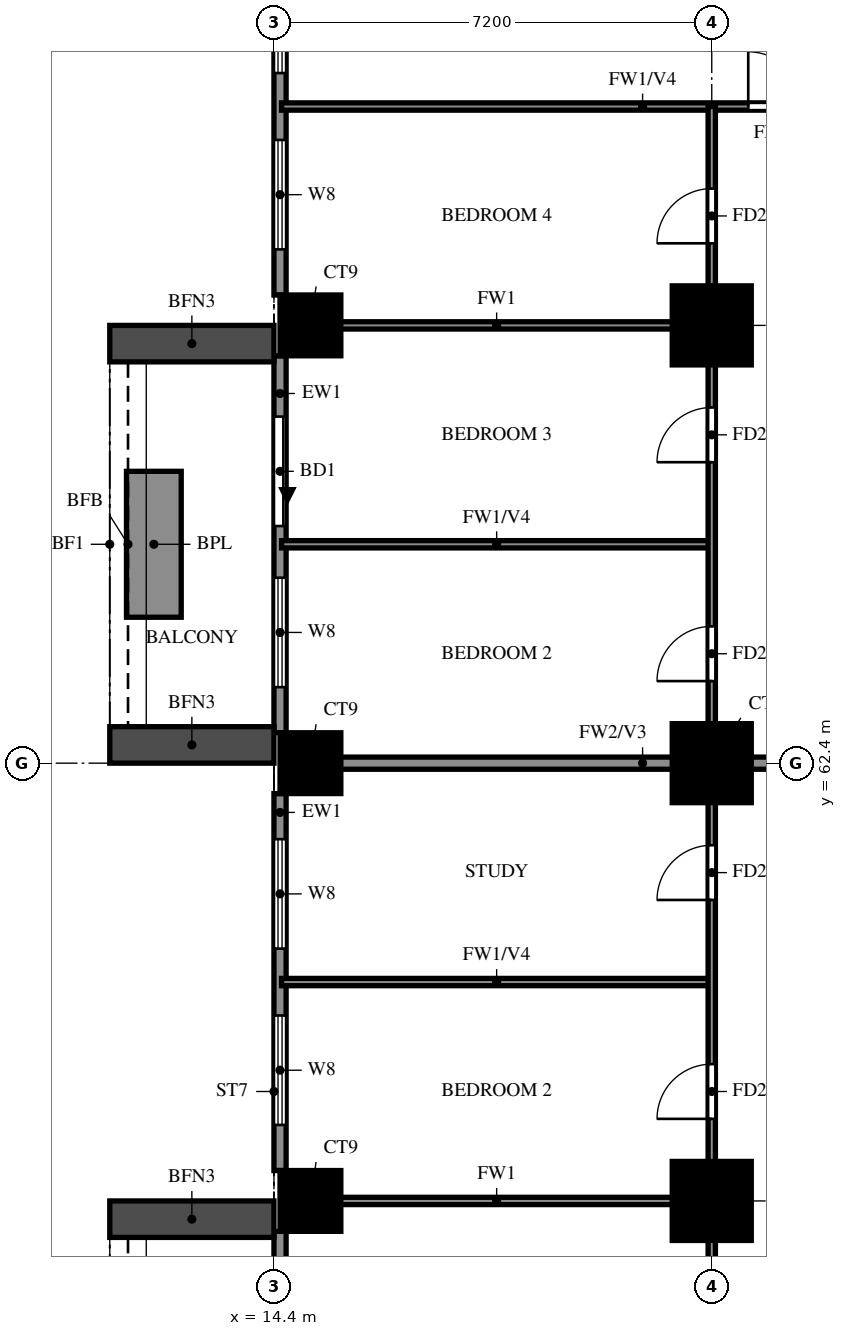
"""IFC4 building model, lengths in metres.
Left out: names, types, materials, properties, quantities, classifications, styles, units other than length and angle.
Written with IfcOpenShell. Run it as: python <this file> out.ifc"""

import sys

from ifc_helpers import new_model, si_unit, direction, frame, frame_2d, origin, origin_2d, place, context, subcontext, project, spatial, rectangle, extrude, source, transform, mapped, element, fill, save


model = new_model("IFC4")
c1 = context("Model", 3, precision=1e-05, world=origin(), true_north=direction((0.0, 1.0)))
c2 = subcontext(c1, "Body", "Model", "MODEL_VIEW")
j1 = project(units=[si_unit("LENGTHUNIT", "METRE"), si_unit("PLANEANGLEUNIT", "RADIAN")], contexts=[c1])
p1 = place(None, origin())
s1 = spatial("IfcSite", under=j1, at=p1, CompositionType="ELEMENT")
p2 = place(p1, origin())
s2 = spatial("IfcBuilding", under=s1, at=p2, CompositionType="ELEMENT")
p3 = place(p2, frame((0.0, 0.0, 79.5)))
s3 = spatial("IfcBuildingStorey", under=s2, at=p3, CompositionType="ELEMENT", Elevation=79.5)
m1 = source(origin(), c2, "Body", "SweptSolid", [
    extrude(rectangle(XDim=1.0, YDim=1.0, at=origin_2d()), origin(), (0.0, 0.0, 1.0), 3.18),
])
p4 = place(p3, frame((15.0, 55.2, 0.0), z_axis=(0.0, 0.0, 1.0), x_axis=(1.0, 0.0, 0.0)))
e1 = element("IfcColumn", 1, at=p4, inside=s3, PredefinedType="COLUMN", context=c2, shape_type="MappedRepresentation", body=[
    mapped(m1, transform((0.0, 0.0, 0.0))),
])
m2 = source(origin(), c2, "Body", "SweptSolid", [
    extrude(rectangle(XDim=1.3, YDim=1.3, at=origin_2d()), origin(), (0.0, 0.0, 1.0), 3.18),
])
p5 = place(p3, frame((21.6, 55.2, 0.0), z_axis=(0.0, 0.0, 1.0), x_axis=(1.0, 0.0, 0.0)))
e2 = element("IfcColumn", 2, at=p5, inside=s3, PredefinedType="COLUMN", context=c2, shape_type="MappedRepresentation", body=[
    mapped(m2, transform((0.0, 0.0, 0.0))),
])
p6 = place(p3, frame((15.0, 62.4, 0.0), z_axis=(0.0, 0.0, 1.0), x_axis=(1.0, 0.0, 0.0)))
e3 = element("IfcColumn", 3, at=p6, inside=s3, PredefinedType="COLUMN", context=c2, shape_type="MappedRepresentation", body=[
    mapped(m1, transform((0.0, 0.0, 0.0))),
])
p7 = place(p3, frame((21.6, 62.4, 0.0), z_axis=(0.0, 0.0, 1.0), x_axis=(1.0, 0.0, 0.0)))
e4 = element("IfcColumn", 4, at=p7, inside=s3, PredefinedType="COLUMN", context=c2, shape_type="MappedRepresentation", body=[
    mapped(m2, transform((0.0, 0.0, 0.0))),
])
p8 = place(p3, frame((15.0, 69.6, 0.0), z_axis=(0.0, 0.0, 1.0), x_axis=(1.0, 0.0, 0.0)))
e5 = element("IfcColumn", 5, at=p8, inside=s3, PredefinedType="COLUMN", context=c2, shape_type="MappedRepresentation", body=[
    mapped(m1, transform((0.0, 0.0, 0.0))),
])
p9 = place(p3, frame((21.6, 69.6, 0.0), z_axis=(0.0, 0.0, 1.0), x_axis=(1.0, 0.0, 0.0)))
e6 = element("IfcColumn", 6, at=p9, inside=s3, PredefinedType="COLUMN", context=c2, shape_type="MappedRepresentation", body=[
    mapped(m2, transform((0.0, 0.0, 0.0))),
])
p10 = place(p3, frame((14.5, 76.3, 0.0), z_axis=(0.0, 0.0, 1.0), x_axis=(0.0, -1.0, 0.0)))
e7 = element("IfcWall", 7, at=p10, inside=s3, PredefinedType="SOLIDWALL", context=c2, shape_type="SweptSolid", body=[
    extrude(rectangle(XDim=6.2, YDim=0.2, at=frame_2d((3.1, 0.0))), origin(), (0.0, 0.0, 1.0), 3.18),
])
p11 = place(p10, frame((3.65, 0.0, 0.6)))
e8 = element("IfcOpeningElement", 8, at=p11, cuts=e7, PredefinedType="OPENING", context=c2, shape_type="SweptSolid", body=[
    extrude(rectangle(XDim=1.8, YDim=2.4, at=frame_2d((0.9, 1.2))), frame((0.0, 0.11, 0.0), z_axis=(0.0, -1.0, 0.0), x_axis=(1.0, 0.0, 0.0)), (0.0, 0.0, 1.0), 0.22),
])
p12 = place(p10, frame((0.75, 0.0, 0.6)))
e9 = element("IfcOpeningElement", 9, at=p12, cuts=e7, PredefinedType="OPENING", context=c2, shape_type="SweptSolid", body=[
    extrude(rectangle(XDim=1.8, YDim=2.4, at=frame_2d((0.9, 1.2))), frame((0.0, 0.11, 0.0), z_axis=(0.0, -1.0, 0.0), x_axis=(1.0, 0.0, 0.0)), (0.0, 0.0, 1.0), 0.22),
])
p13 = place(p3, frame((14.5, 69.1, 0.0), z_axis=(0.0, 0.0, 1.0), x_axis=(0.0, -1.0, 0.0)))
e10 = element("IfcWall", 10, at=p13, inside=s3, PredefinedType="SOLIDWALL", context=c2, shape_type="SweptSolid", body=[
    extrude(rectangle(XDim=6.2, YDim=0.2, at=frame_2d((3.1, 0.0))), origin(), (0.0, 0.0, 1.0), 3.18),
])
p14 = place(p13, frame((1.0, 0.0, 0.0)))
e11 = element("IfcOpeningElement", 11, at=p14, cuts=e10, PredefinedType="OPENING", context=c2, shape_type="SweptSolid", body=[
    extrude(rectangle(XDim=1.8, YDim=2.4, at=frame_2d((0.9, 1.2))), frame((0.0, 0.11, 0.0), z_axis=(0.0, -1.0, 0.0), x_axis=(1.0, 0.0, 0.0)), (0.0, 0.0, 1.0), 0.22),
])
p15 = place(p13, frame((3.65, 0.0, 0.6)))
e12 = element("IfcOpeningElement", 12, at=p15, cuts=e10, PredefinedType="OPENING", context=c2, shape_type="SweptSolid", body=[
    extrude(rectangle(XDim=1.8, YDim=2.4, at=frame_2d((0.9, 1.2))), frame((0.0, 0.11, 0.0), z_axis=(0.0, -1.0, 0.0), x_axis=(1.0, 0.0, 0.0)), (0.0, 0.0, 1.0), 0.22),
])
p16 = place(p3, frame((14.5, 61.9, 0.0), z_axis=(0.0, 0.0, 1.0), x_axis=(0.0, -1.0, 0.0)))
e13 = element("IfcWall", 13, at=p16, inside=s3, PredefinedType="SOLIDWALL", context=c2, shape_type="SweptSolid", body=[
    extrude(rectangle(XDim=6.2, YDim=0.2, at=frame_2d((3.1, 0.0))), origin(), (0.0, 0.0, 1.0), 3.18),
])
p17 = place(p16, frame((3.65, 0.0, 0.6)))
e14 = element("IfcOpeningElement", 14, at=p17, cuts=e13, PredefinedType="OPENING", context=c2, shape_type="SweptSolid", body=[
    extrude(rectangle(XDim=1.8, YDim=2.4, at=frame_2d((0.9, 1.2))), frame((0.0, 0.11, 0.0), z_axis=(0.0, -1.0, 0.0), x_axis=(1.0, 0.0, 0.0)), (0.0, 0.0, 1.0), 0.22),
])
p18 = place(p16, frame((0.75, 0.0, 0.6)))
e15 = element("IfcOpeningElement", 15, at=p18, cuts=e13, PredefinedType="OPENING", context=c2, shape_type="SweptSolid", body=[
    extrude(rectangle(XDim=1.8, YDim=2.4, at=frame_2d((0.9, 1.2))), frame((0.0, 0.11, 0.0), z_axis=(0.0, -1.0, 0.0), x_axis=(1.0, 0.0, 0.0)), (0.0, 0.0, 1.0), 0.22),
])
p19 = place(p3, frame((14.5, 54.7, 0.0), z_axis=(0.0, 0.0, 1.0), x_axis=(0.0, -1.0, 0.0)))
e16 = element("IfcWall", 16, at=p19, inside=s3, PredefinedType="SOLIDWALL", context=c2, shape_type="SweptSolid", body=[
    extrude(rectangle(XDim=6.2, YDim=0.2, at=frame_2d((3.1, 0.0))), origin(), (0.0, 0.0, 1.0), 3.18),
])
p20 = place(p19, frame((2.2, 0.0, 0.0)))
e17 = element("IfcOpeningElement", 17, at=p20, cuts=e16, PredefinedType="OPENING", context=c2, shape_type="SweptSolid", body=[
    extrude(rectangle(XDim=1.8, YDim=2.4, at=frame_2d((0.9, 1.2))), frame((0.0, 0.11, 0.0), z_axis=(0.0, -1.0, 0.0), x_axis=(1.0, 0.0, 0.0)), (0.0, 0.0, 1.0), 0.22),
])
p21 = place(p19, frame((0.45, 0.0, 0.6)))
e18 = element("IfcOpeningElement", 18, at=p21, cuts=e16, PredefinedType="OPENING", context=c2, shape_type="SweptSolid", body=[
    extrude(rectangle(XDim=1.2, YDim=2.4, at=frame_2d((0.6, 1.2))), frame((0.0, 0.11, 0.0), z_axis=(0.0, -1.0, 0.0), x_axis=(1.0, 0.0, 0.0)), (0.0, 0.0, 1.0), 0.22),
])
p22 = place(p19, frame((4.55, 0.0, 0.6)))
e19 = element("IfcOpeningElement", 19, at=p22, cuts=e16, PredefinedType="OPENING", context=c2, shape_type="SweptSolid", body=[
    extrude(rectangle(XDim=1.2, YDim=2.4, at=frame_2d((0.6, 1.2))), frame((0.0, 0.11, 0.0), z_axis=(0.0, -1.0, 0.0), x_axis=(1.0, 0.0, 0.0)), (0.0, 0.0, 1.0), 0.22),
])
for number, where, z_axis, x_axis in (
    (20, (14.4, 69.3, 0.0), (0.0, 0.0, 1.0), (-1.0, 0.0, 0.0)),
    (21, (14.4, 62.7, 0.0), (0.0, 0.0, 1.0), (-1.0, 0.0, 0.0)),
):
    element("IfcWall", number, at=place(p3, frame(where, z_axis=z_axis, x_axis=x_axis)), inside=s3, PredefinedType="SOLIDWALL", context=c2, shape_type="SweptSolid", body=[
        extrude(rectangle(XDim=2.7, YDim=0.6, at=frame_2d((1.35, 0.0))), origin(), (0.0, 0.0, 1.0), 2.85),
    ])
p23 = place(p3, frame((12.425, 67.2, 0.0), z_axis=(0.0, 0.0, 1.0), x_axis=(0.0, -1.0, 0.0)))
e22 = element("IfcWall", 22, at=p23, inside=s3, PredefinedType="SOLIDWALL", context=c2, shape_type="SweptSolid", body=[
    extrude(rectangle(XDim=2.4, YDim=0.9, at=frame_2d((1.2, 0.0))), origin(), (0.0, 0.0, 1.0), 0.9),
])
p24 = place(p3, frame((14.4, 54.9, 0.0), z_axis=(0.0, 0.0, 1.0), x_axis=(-1.0, 0.0, 0.0)))
e23 = element("IfcWall", 23, at=p24, inside=s3, PredefinedType="SOLIDWALL", context=c2, shape_type="SweptSolid", body=[
    extrude(rectangle(XDim=2.7, YDim=0.6, at=frame_2d((1.35, 0.0))), origin(), (0.0, 0.0, 1.0), 2.85),
])
p25 = place(p3, frame((14.525, 62.4, 0.0), z_axis=(0.0, 0.0, 1.0), x_axis=(1.0, 0.0, 0.0)))
e24 = element("IfcWall", 24, at=p25, inside=s3, PredefinedType="SOLIDWALL", context=c2, shape_type="SweptSolid", body=[
    extrude(rectangle(XDim=11.875, YDim=0.2, at=frame_2d((5.938, 0.0))), origin(), (0.0, 0.0, 1.0), 3.18),
])
p26 = place(p3, frame((14.525, 55.2, 0.0), z_axis=(0.0, 0.0, 1.0), x_axis=(1.0, 0.0, 0.0)))
e25 = element("IfcWall", 25, at=p26, inside=s3, PredefinedType="PARTITIONING", context=c2, shape_type="SweptSolid", body=[
    extrude(rectangle(XDim=7.075, YDim=0.12, at=frame_2d((3.538, 0.0))), origin(), (0.0, 0.0, 1.0), 3.18),
])
for number, where, z_axis, x_axis in (
    (26, (14.525, 58.8, 0.0), (0.0, 0.0, 1.0), (1.0, 0.0, 0.0)),
    (27, (14.525, 66.0, 0.0), (0.0, 0.0, 1.0), (1.0, 0.0, 0.0)),
):
    element("IfcWall", number, at=place(p3, frame(where, z_axis=z_axis, x_axis=x_axis)), inside=s3, PredefinedType="PARTITIONING", context=c2, shape_type="SweptSolid", body=[
        extrude(rectangle(XDim=7.075, YDim=0.12, at=frame_2d((3.538, 0.0))), origin(), (0.0, 0.0, 1.0), 2.28),
    ])
p27 = place(p3, frame((14.525, 69.6, 0.0), z_axis=(0.0, 0.0, 1.0), x_axis=(1.0, 0.0, 0.0)))
e28 = element("IfcWall", 28, at=p27, inside=s3, PredefinedType="PARTITIONING", context=c2, shape_type="SweptSolid", body=[
    extrude(rectangle(XDim=7.075, YDim=0.12, at=frame_2d((3.538, 0.0))), origin(), (0.0, 0.0, 1.0), 3.18),
])
p28 = place(p3, frame((14.525, 73.2, 0.0), z_axis=(0.0, 0.0, 1.0), x_axis=(1.0, 0.0, 0.0)))
e29 = element("IfcWall", 29, at=p28, inside=s3, PredefinedType="PARTITIONING", context=c2, shape_type="SweptSolid", body=[
    extrude(rectangle(XDim=11.875, YDim=0.12, at=frame_2d((5.938, 0.0))), origin(), (0.0, 0.0, 1.0), 2.28),
])
p29 = place(p28, frame((7.675, 0.0, 0.0)))
e30 = element("IfcOpeningElement", 30, at=p29, cuts=e29, PredefinedType="OPENING", context=c2, shape_type="SweptSolid", body=[
    extrude(rectangle(XDim=0.9, YDim=2.1, at=frame_2d((0.45, 1.05))), frame((0.0, 0.07, 0.0), z_axis=(0.0, -1.0, 0.0), x_axis=(1.0, 0.0, 0.0)), (0.0, 0.0, 1.0), 0.14),
])
p30 = place(p3, frame((21.6, 33.725, 0.0), z_axis=(0.0, 0.0, 1.0), x_axis=(0.0, 1.0, 0.0)))
e31 = element("IfcWall", 31, at=p30, inside=s3, PredefinedType="PARTITIONING", context=c2, shape_type="SweptSolid", body=[
    extrude(rectangle(XDim=39.475, YDim=0.12, at=frame_2d((19.737, 0.0))), origin(), (0.0, 0.0, 1.0), 3.18),
])
p31 = place(p30, frame((7.775, 0.0, 0.0)))
e32 = element("IfcOpeningElement", 32, at=p31, cuts=e31, PredefinedType="OPENING", context=c2, shape_type="SweptSolid", body=[
    extrude(rectangle(XDim=0.9, YDim=2.1, at=frame_2d((0.45, 1.05))), frame((0.0, 0.07, 0.0), z_axis=(0.0, -1.0, 0.0), x_axis=(1.0, 0.0, 0.0)), (0.0, 0.0, 1.0), 0.14),
])
p32 = place(p30, frame((17.125, 0.0, 0.0)))
e33 = element("IfcOpeningElement", 33, at=p32, cuts=e31, PredefinedType="OPENING", context=c2, shape_type="SweptSolid", body=[
    extrude(rectangle(XDim=1.5, YDim=2.1, at=frame_2d((0.75, 1.05))), frame((0.0, 0.07, 0.0), z_axis=(0.0, -1.0, 0.0), x_axis=(1.0, 0.0, 0.0)), (0.0, 0.0, 1.0), 0.14),
])
p33 = place(p30, frame((22.825, 0.0, 0.0)))
e34 = element("IfcOpeningElement", 34, at=p33, cuts=e31, PredefinedType="OPENING", context=c2, shape_type="SweptSolid", body=[
    extrude(rectangle(XDim=0.9, YDim=2.1, at=frame_2d((0.45, 1.05))), frame((0.0, 0.07, 0.0), z_axis=(0.0, -1.0, 0.0), x_axis=(1.0, 0.0, 0.0)), (0.0, 0.0, 1.0), 0.14),
])
p34 = place(p30, frame((26.425, 0.0, 0.0)))
e35 = element("IfcOpeningElement", 35, at=p34, cuts=e31, PredefinedType="OPENING", context=c2, shape_type="SweptSolid", body=[
    extrude(rectangle(XDim=0.9, YDim=2.1, at=frame_2d((0.45, 1.05))), frame((0.0, 0.07, 0.0), z_axis=(0.0, -1.0, 0.0), x_axis=(1.0, 0.0, 0.0)), (0.0, 0.0, 1.0), 0.14),
])
p35 = place(p30, frame((30.025, 0.0, 0.0)))
e36 = element("IfcOpeningElement", 36, at=p35, cuts=e31, PredefinedType="OPENING", context=c2, shape_type="SweptSolid", body=[
    extrude(rectangle(XDim=0.9, YDim=2.1, at=frame_2d((0.45, 1.05))), frame((0.0, 0.07, 0.0), z_axis=(0.0, -1.0, 0.0), x_axis=(1.0, 0.0, 0.0)), (0.0, 0.0, 1.0), 0.14),
])
p36 = place(p30, frame((33.625, 0.0, 0.0)))
e37 = element("IfcOpeningElement", 37, at=p36, cuts=e31, PredefinedType="OPENING", context=c2, shape_type="SweptSolid", body=[
    extrude(rectangle(XDim=0.9, YDim=2.1, at=frame_2d((0.45, 1.05))), frame((0.0, 0.07, 0.0), z_axis=(0.0, -1.0, 0.0), x_axis=(1.0, 0.0, 0.0)), (0.0, 0.0, 1.0), 0.14),
])
p37 = place(p30, frame((37.225, 0.0, 0.0)))
e38 = element("IfcOpeningElement", 38, at=p37, cuts=e31, PredefinedType="OPENING", context=c2, shape_type="SweptSolid", body=[
    extrude(rectangle(XDim=0.9, YDim=2.1, at=frame_2d((0.45, 1.05))), frame((0.0, 0.07, 0.0), z_axis=(0.0, -1.0, 0.0), x_axis=(1.0, 0.0, 0.0)), (0.0, 0.0, 1.0), 0.14),
])
p38 = place(p11, origin())
e39 = element("IfcWindow", 39, at=p38, inside=s3, PartitioningType="DOUBLE_PANEL_VERTICAL", PredefinedType="WINDOW", context=c2, shape_type="SweptSolid", body=[
    extrude(rectangle(XDim=1.8, YDim=2.4, at=frame_2d((0.9, 1.2))), frame((0.0, 0.03, 0.0), z_axis=(0.0, -1.0, 0.0), x_axis=(1.0, 0.0, 0.0)), (0.0, 0.0, 1.0), 0.06),
])
fill(e8, e39)
p39 = place(p12, origin())
e40 = element("IfcWindow", 40, at=p39, inside=s3, PartitioningType="DOUBLE_PANEL_VERTICAL", PredefinedType="WINDOW", context=c2, shape_type="SweptSolid", body=[
    extrude(rectangle(XDim=1.8, YDim=2.4, at=frame_2d((0.9, 1.2))), frame((0.0, 0.03, 0.0), z_axis=(0.0, -1.0, 0.0), x_axis=(1.0, 0.0, 0.0)), (0.0, 0.0, 1.0), 0.06),
])
fill(e9, e40)
p40 = place(p14, origin())
e41 = element("IfcDoor", 41, at=p40, inside=s3, OperationType="DOUBLE_DOOR_SLIDING", PredefinedType="DOOR", context=c2, shape_type="SweptSolid", body=[
    extrude(rectangle(XDim=1.8, YDim=2.4, at=frame_2d((0.9, 1.2))), frame((0.0, 0.025, 0.0), z_axis=(0.0, -1.0, 0.0), x_axis=(1.0, 0.0, 0.0)), (0.0, 0.0, 1.0), 0.05),
])
fill(e11, e41)
p41 = place(p15, origin())
e42 = element("IfcWindow", 42, at=p41, inside=s3, PartitioningType="DOUBLE_PANEL_VERTICAL", PredefinedType="WINDOW", context=c2, shape_type="SweptSolid", body=[
    extrude(rectangle(XDim=1.8, YDim=2.4, at=frame_2d((0.9, 1.2))), frame((0.0, 0.03, 0.0), z_axis=(0.0, -1.0, 0.0), x_axis=(1.0, 0.0, 0.0)), (0.0, 0.0, 1.0), 0.06),
])
fill(e12, e42)
p42 = place(p17, origin())
e43 = element("IfcWindow", 43, at=p42, inside=s3, PartitioningType="DOUBLE_PANEL_VERTICAL", PredefinedType="WINDOW", context=c2, shape_type="SweptSolid", body=[
    extrude(rectangle(XDim=1.8, YDim=2.4, at=frame_2d((0.9, 1.2))), frame((0.0, 0.03, 0.0), z_axis=(0.0, -1.0, 0.0), x_axis=(1.0, 0.0, 0.0)), (0.0, 0.0, 1.0), 0.06),
])
fill(e14, e43)
p43 = place(p18, origin())
e44 = element("IfcWindow", 44, at=p43, inside=s3, PartitioningType="DOUBLE_PANEL_VERTICAL", PredefinedType="WINDOW", context=c2, shape_type="SweptSolid", body=[
    extrude(rectangle(XDim=1.8, YDim=2.4, at=frame_2d((0.9, 1.2))), frame((0.0, 0.03, 0.0), z_axis=(0.0, -1.0, 0.0), x_axis=(1.0, 0.0, 0.0)), (0.0, 0.0, 1.0), 0.06),
])
fill(e15, e44)
p44 = place(p33, origin())
e45 = element("IfcDoor", 45, at=p44, inside=s3, OperationType="SINGLE_SWING_LEFT", PredefinedType="DOOR", context=c2, shape_type="SweptSolid", body=[
    extrude(rectangle(XDim=0.9, YDim=2.1, at=frame_2d((0.45, 1.05))), frame((0.0, 0.025, 0.0), z_axis=(0.0, -1.0, 0.0), x_axis=(1.0, 0.0, 0.0)), (0.0, 0.0, 1.0), 0.05),
])
fill(e34, e45)
p45 = place(p34, origin())
e46 = element("IfcDoor", 46, at=p45, inside=s3, OperationType="SINGLE_SWING_LEFT", PredefinedType="DOOR", context=c2, shape_type="SweptSolid", body=[
    extrude(rectangle(XDim=0.9, YDim=2.1, at=frame_2d((0.45, 1.05))), frame((0.0, 0.025, 0.0), z_axis=(0.0, -1.0, 0.0), x_axis=(1.0, 0.0, 0.0)), (0.0, 0.0, 1.0), 0.05),
])
fill(e35, e46)
p46 = place(p35, origin())
e47 = element("IfcDoor", 47, at=p46, inside=s3, OperationType="SINGLE_SWING_LEFT", PredefinedType="DOOR", context=c2, shape_type="SweptSolid", body=[
    extrude(rectangle(XDim=0.9, YDim=2.1, at=frame_2d((0.45, 1.05))), frame((0.0, 0.025, 0.0), z_axis=(0.0, -1.0, 0.0), x_axis=(1.0, 0.0, 0.0)), (0.0, 0.0, 1.0), 0.05),
])
fill(e36, e47)
p47 = place(p36, origin())
e48 = element("IfcDoor", 48, at=p47, inside=s3, OperationType="SINGLE_SWING_LEFT", PredefinedType="DOOR", context=c2, shape_type="SweptSolid", body=[
    extrude(rectangle(XDim=0.9, YDim=2.1, at=frame_2d((0.45, 1.05))), frame((0.0, 0.025, 0.0), z_axis=(0.0, -1.0, 0.0), x_axis=(1.0, 0.0, 0.0)), (0.0, 0.0, 1.0), 0.05),
])
fill(e37, e48)
p48 = place(p37, origin())
e49 = element("IfcDoor", 49, at=p48, inside=s3, OperationType="SINGLE_SWING_RIGHT", PredefinedType="DOOR", context=c2, shape_type="SweptSolid", body=[
    extrude(rectangle(XDim=0.9, YDim=2.1, at=frame_2d((0.45, 1.05))), frame((0.0, 0.025, 0.0), z_axis=(0.0, -1.0, 0.0), x_axis=(1.0, 0.0, 0.0)), (0.0, 0.0, 1.0), 0.05),
])
fill(e38, e49)
p49 = place(p29, origin())
e50 = element("IfcDoor", 50, at=p49, inside=s3, OperationType="SINGLE_SWING_LEFT", PredefinedType="DOOR", context=c2, shape_type="SweptSolid", body=[
    extrude(rectangle(XDim=0.9, YDim=2.1, at=frame_2d((0.45, 1.05))), frame((0.0, 0.025, 0.0), z_axis=(0.0, -1.0, 0.0), x_axis=(1.0, 0.0, 0.0)), (0.0, 0.0, 1.0), 0.05),
])
fill(e30, e50)
save(model, sys.argv[1])
